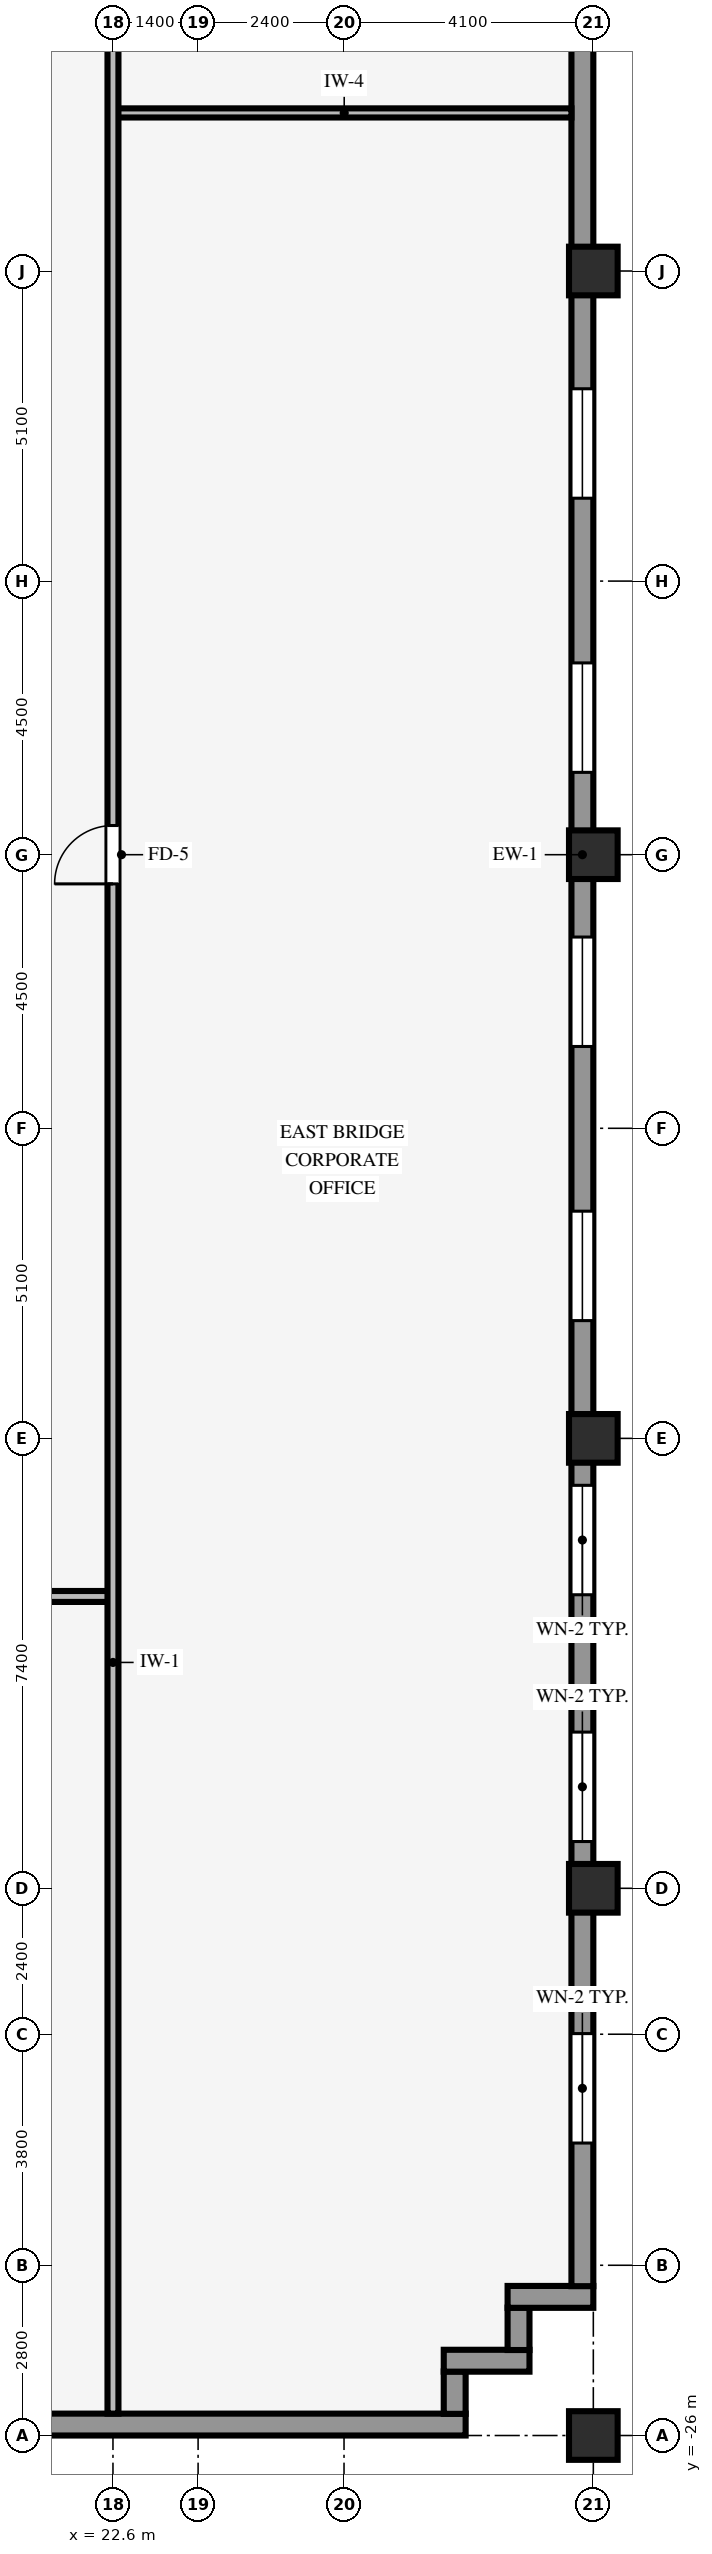
"""IFC4 building model, lengths in metres.
Left out: names, types, materials, properties, quantities, classifications, styles, units other than length and angle.
Written with IfcOpenShell. Run it as: python <this file> out.ifc"""

import sys

from ifc_helpers import new_model, si_unit, direction, frame, frame_2d, origin, origin_2d, place, context, subcontext, project, spatial, rectangle, hollow_rectangle, extrude, source, transform, mapped, element, fill, save


model = new_model("IFC4")
c1 = context("Model", 3, precision=1e-05, world=origin(), true_north=direction((0.0, 1.0)))
c2 = subcontext(c1, "Body", "Model", "MODEL_VIEW")
j1 = project(units=[si_unit("LENGTHUNIT", "METRE"), si_unit("PLANEANGLEUNIT", "RADIAN")], contexts=[c1])
p1 = place(None, origin())
s1 = spatial("IfcSite", under=j1, at=p1, CompositionType="ELEMENT")
p2 = place(p1, origin())
s2 = spatial("IfcBuilding", under=s1, at=p2, CompositionType="ELEMENT")
p3 = place(p2, frame((0.0, 0.0, 23.0)))
s3 = spatial("IfcBuildingStorey", under=s2, at=p3, CompositionType="ELEMENT", Elevation=23.0)
p4 = place(p3, frame((30.5, -26.0, -0.4), z_axis=(0.0, 0.0, 1.0), x_axis=(1.0, 0.0, 0.0)))
e1 = element("IfcColumn", 1, at=p4, inside=s3, PredefinedType="COLUMN", context=c2, shape_type="SweptSolid", body=[
    extrude(hollow_rectangle(XDim=0.8, YDim=0.8, WallThickness=0.055, InnerFilletRadius=0.055, OuterFilletRadius=0.11, at=origin_2d()), origin(), (0.0, 0.0, 1.0), 4.6),
])
for number, where, z_axis, x_axis in (
    (2, (30.5, -17.0, 0.0), (0.0, 0.0, 1.0), (1.0, 0.0, 0.0)),
    (3, (30.5, -9.6, 0.0), (0.0, 0.0, 1.0), (1.0, 0.0, 0.0)),
    (4, (30.5, 0.0, 0.0), (0.0, 0.0, 1.0), (1.0, 0.0, 0.0)),
    (5, (30.5, 9.6, 0.0), (0.0, 0.0, 1.0), (1.0, 0.0, 0.0)),
):
    element("IfcColumn", number, at=place(p3, frame(where, z_axis=z_axis, x_axis=x_axis)), inside=s3, PredefinedType="COLUMN", context=c2, shape_type="SweptSolid", body=[
        extrude(hollow_rectangle(XDim=0.8, YDim=0.8, WallThickness=0.055, InnerFilletRadius=0.055, OuterFilletRadius=0.11, at=origin_2d()), origin(), (0.0, 0.0, 1.0), 4.2),
    ])
p5 = place(p3, frame((3.6, -25.82, 0.0), z_axis=(0.0, 0.0, 1.0), x_axis=(1.0, 0.0, 0.0)))
e6 = element("IfcWall", 6, at=p5, inside=s3, PredefinedType="STANDARD", context=c2, shape_type="SweptSolid", body=[
    extrude(rectangle(XDim=24.8, YDim=0.36, at=frame_2d((12.4, 0.0))), origin(), (0.0, 0.0, 1.0), 2.785),
])
p6 = place(p3, frame((28.22, -25.644, 0.0), z_axis=(0.0, 0.0, 1.0), x_axis=(0.0, 1.0, 0.0)))
e7 = element("IfcWall", 7, at=p6, inside=s3, PredefinedType="STANDARD", context=c2, shape_type="SweptSolid", body=[
    extrude(rectangle(XDim=0.698, YDim=0.36, at=frame_2d((0.349, 0.0))), origin(), (0.0, 0.0, 1.0), 4.19),
])
p7 = place(p3, frame((28.04, -24.77, 0.0), z_axis=(0.0, 0.0, 1.0), x_axis=(1.0, 0.0, 0.0)))
e8 = element("IfcWall", 8, at=p7, inside=s3, PredefinedType="STANDARD", context=c2, shape_type="SweptSolid", body=[
    extrude(rectangle(XDim=1.41, YDim=0.36, at=frame_2d((0.705, 0.0))), origin(), (0.0, 0.0, 1.0), 4.19),
])
p8 = place(p3, frame((29.27, -24.594, 0.0), z_axis=(0.0, 0.0, 1.0), x_axis=(0.0, 1.0, 0.0)))
e9 = element("IfcWall", 9, at=p8, inside=s3, PredefinedType="STANDARD", context=c2, shape_type="SweptSolid", body=[
    extrude(rectangle(XDim=0.698, YDim=0.36, at=frame_2d((0.349, 0.0))), origin(), (0.0, 0.0, 1.0), 4.19),
])
p9 = place(p3, frame((29.09, -23.72, 0.0), z_axis=(0.0, 0.0, 1.0), x_axis=(1.0, 0.0, 0.0)))
e10 = element("IfcWall", 10, at=p9, inside=s3, PredefinedType="STANDARD", context=c2, shape_type="SweptSolid", body=[
    extrude(rectangle(XDim=1.41, YDim=0.36, at=frame_2d((0.705, 0.0))), origin(), (0.0, 0.0, 1.0), 4.19),
])
p10 = place(p3, frame((30.32, -23.544, 0.0), z_axis=(0.0, 0.0, 1.0), x_axis=(0.0, 1.0, 0.0)))
e11 = element("IfcWall", 11, at=p10, inside=s3, PredefinedType="STANDARD", context=c2, shape_type="SweptSolid", body=[
    extrude(rectangle(XDim=47.088, YDim=0.36, at=frame_2d((23.544, 0.0))), origin(), (0.0, 0.0, 1.0), 3.702),
])
p11 = place(p10, frame((2.354, 0.0, 0.85)))
e12 = element("IfcOpeningElement", 12, at=p11, cuts=e11, PredefinedType="OPENING", context=c2, shape_type="SweptSolid", body=[
    extrude(rectangle(XDim=1.8, YDim=2.35, at=frame_2d((0.9, 1.175))), frame((0.0, 0.19, 0.0), z_axis=(0.0, -1.0, 0.0), x_axis=(1.0, 0.0, 0.0)), (0.0, 0.0, 1.0), 0.38),
])
p12 = place(p10, frame((7.313, 0.0, 0.85)))
e13 = element("IfcOpeningElement", 13, at=p12, cuts=e11, PredefinedType="OPENING", context=c2, shape_type="SweptSolid", body=[
    extrude(rectangle(XDim=1.8, YDim=2.35, at=frame_2d((0.9, 1.175))), frame((0.0, 0.19, 0.0), z_axis=(0.0, -1.0, 0.0), x_axis=(1.0, 0.0, 0.0)), (0.0, 0.0, 1.0), 0.38),
])
p13 = place(p10, frame((11.372, 0.0, 0.85)))
e14 = element("IfcOpeningElement", 14, at=p13, cuts=e11, PredefinedType="OPENING", context=c2, shape_type="SweptSolid", body=[
    extrude(rectangle(XDim=1.8, YDim=2.35, at=frame_2d((0.9, 1.175))), frame((0.0, 0.19, 0.0), z_axis=(0.0, -1.0, 0.0), x_axis=(1.0, 0.0, 0.0)), (0.0, 0.0, 1.0), 0.38),
])
p14 = place(p10, frame((15.881, 0.0, 0.85)))
e15 = element("IfcOpeningElement", 15, at=p14, cuts=e11, PredefinedType="OPENING", context=c2, shape_type="SweptSolid", body=[
    extrude(rectangle(XDim=1.8, YDim=2.35, at=frame_2d((0.9, 1.175))), frame((0.0, 0.19, 0.0), z_axis=(0.0, -1.0, 0.0), x_axis=(1.0, 0.0, 0.0)), (0.0, 0.0, 1.0), 0.38),
])
p15 = place(p10, frame((20.39, 0.0, 0.85)))
e16 = element("IfcOpeningElement", 16, at=p15, cuts=e11, PredefinedType="OPENING", context=c2, shape_type="SweptSolid", body=[
    extrude(rectangle(XDim=1.8, YDim=2.35, at=frame_2d((0.9, 1.175))), frame((0.0, 0.19, 0.0), z_axis=(0.0, -1.0, 0.0), x_axis=(1.0, 0.0, 0.0)), (0.0, 0.0, 1.0), 0.38),
])
p16 = place(p10, frame((24.898, 0.0, 0.85)))
e17 = element("IfcOpeningElement", 17, at=p16, cuts=e11, PredefinedType="OPENING", context=c2, shape_type="SweptSolid", body=[
    extrude(rectangle(XDim=1.8, YDim=2.35, at=frame_2d((0.9, 1.175))), frame((0.0, 0.19, 0.0), z_axis=(0.0, -1.0, 0.0), x_axis=(1.0, 0.0, 0.0)), (0.0, 0.0, 1.0), 0.38),
])
p17 = place(p10, frame((29.407, 0.0, 0.85)))
e18 = element("IfcOpeningElement", 18, at=p17, cuts=e11, PredefinedType="OPENING", context=c2, shape_type="SweptSolid", body=[
    extrude(rectangle(XDim=1.8, YDim=2.35, at=frame_2d((0.9, 1.175))), frame((0.0, 0.19, 0.0), z_axis=(0.0, -1.0, 0.0), x_axis=(1.0, 0.0, 0.0)), (0.0, 0.0, 1.0), 0.38),
])
p18 = place(p10, frame((42.034, 0.0, 0.85)))
e19 = element("IfcOpeningElement", 19, at=p18, cuts=e11, PredefinedType="OPENING", context=c2, shape_type="SweptSolid", body=[
    extrude(rectangle(XDim=1.8, YDim=2.35, at=frame_2d((0.9, 1.175))), frame((0.0, 0.19, 0.0), z_axis=(0.0, -1.0, 0.0), x_axis=(1.0, 0.0, 0.0)), (0.0, 0.0, 1.0), 0.38),
])
p19 = place(p3, frame((-8.8, -12.2, 0.0), z_axis=(0.0, 0.0, 1.0), x_axis=(1.0, 0.0, 0.0)))
e20 = element("IfcWall", 20, at=p19, inside=s3, PredefinedType="PARTITIONING", context=c2, shape_type="SweptSolid", body=[
    extrude(rectangle(XDim=31.334, YDim=0.18, at=frame_2d((15.667, 0.0))), origin(), (0.0, 0.0, 1.0), 4.19),
])
p20 = place(p19, frame((8.32, 0.0, 0.0)))
e21 = element("IfcOpeningElement", 21, at=p20, cuts=e20, PredefinedType="OPENING", context=c2, shape_type="SweptSolid", body=[
    extrude(rectangle(XDim=0.96, YDim=2.1, at=frame_2d((0.48, 1.05))), frame((0.0, 0.1, 0.0), z_axis=(0.0, -1.0, 0.0), x_axis=(1.0, 0.0, 0.0)), (0.0, 0.0, 1.0), 0.2),
])
p21 = place(p19, frame((22.62, 0.0, 0.0)))
e22 = element("IfcOpeningElement", 22, at=p21, cuts=e20, PredefinedType="OPENING", context=c2, shape_type="SweptSolid", body=[
    extrude(rectangle(XDim=0.96, YDim=2.1, at=frame_2d((0.48, 1.05))), frame((0.0, 0.1, 0.0), z_axis=(0.0, -1.0, 0.0), x_axis=(1.0, 0.0, 0.0)), (0.0, 0.0, 1.0), 0.2),
])
p22 = place(p3, frame((22.666, 12.2, 0.0), z_axis=(0.0, 0.0, 1.0), x_axis=(1.0, 0.0, 0.0)))
e23 = element("IfcWall", 23, at=p22, inside=s3, PredefinedType="PARTITIONING", context=c2, shape_type="SweptSolid", body=[
    extrude(rectangle(XDim=7.474, YDim=0.15, at=frame_2d((3.737, 0.0))), origin(), (0.0, 0.0, 1.0), 4.19),
])
p23 = place(p3, frame((22.6, -25.64, 0.0), z_axis=(0.0, 0.0, 1.0), x_axis=(0.0, 1.0, 0.0)))
e24 = element("IfcWall", 24, at=p23, inside=s3, PredefinedType="PARTITIONING", context=c2, shape_type="SweptSolid", body=[
    extrude(rectangle(XDim=51.28, YDim=0.18, at=frame_2d((25.64, 0.0))), origin(), (0.0, 0.0, 1.0), 4.19),
])
p24 = place(p23, frame((25.16, 0.0, 0.0)))
e25 = element("IfcOpeningElement", 25, at=p24, cuts=e24, PredefinedType="OPENING", context=c2, shape_type="SweptSolid", body=[
    extrude(rectangle(XDim=0.96, YDim=2.1, at=frame_2d((0.48, 1.05))), frame((0.0, 0.1, 0.0), z_axis=(0.0, -1.0, 0.0), x_axis=(1.0, 0.0, 0.0)), (0.0, 0.0, 1.0), 0.2),
])
p25 = place(p23, frame((43.09, 0.0, 0.0)))
e26 = element("IfcOpeningElement", 26, at=p25, cuts=e24, PredefinedType="OPENING", context=c2, shape_type="SweptSolid", body=[
    extrude(rectangle(XDim=0.9, YDim=2.1, at=frame_2d((0.45, 1.05))), frame((0.0, 0.1, 0.0), z_axis=(0.0, -1.0, 0.0), x_axis=(1.0, 0.0, 0.0)), (0.0, 0.0, 1.0), 0.2),
])
p26 = place(p23, frame((38.89, 0.0, 0.0)))
e27 = element("IfcOpeningElement", 27, at=p26, cuts=e24, PredefinedType="OPENING", context=c2, shape_type="SweptSolid", body=[
    extrude(rectangle(XDim=0.9, YDim=2.1, at=frame_2d((0.45, 1.05))), frame((0.0, 0.1, 0.0), z_axis=(0.0, -1.0, 0.0), x_axis=(1.0, 0.0, 0.0)), (0.0, 0.0, 1.0), 0.2),
])
p27 = place(p23, frame((47.29, 0.0, 0.0)))
e28 = element("IfcOpeningElement", 28, at=p27, cuts=e24, PredefinedType="OPENING", context=c2, shape_type="SweptSolid", body=[
    extrude(rectangle(XDim=0.9, YDim=2.1, at=frame_2d((0.45, 1.05))), frame((0.0, 0.1, 0.0), z_axis=(0.0, -1.0, 0.0), x_axis=(1.0, 0.0, 0.0)), (0.0, 0.0, 1.0), 0.2),
])
m1 = source(origin(), c2, "Body", "SweptSolid", [
    extrude(rectangle(XDim=1.8, YDim=2.35, at=frame_2d((0.9, 1.175))), frame((0.0, 0.03, 0.0), z_axis=(0.0, -1.0, 0.0), x_axis=(1.0, 0.0, 0.0)), (0.0, 0.0, 1.0), 0.06),
])
p28 = place(p11, origin())
e29 = element("IfcWindow", 29, at=p28, inside=s3, PartitioningType="SINGLE_PANEL", PredefinedType="WINDOW", context=c2, shape_type="MappedRepresentation", body=[
    mapped(m1, transform((0.0, 0.0, 0.0), scale=1.0)),
])
fill(e12, e29)
p29 = place(p12, origin())
e30 = element("IfcWindow", 30, at=p29, inside=s3, PartitioningType="SINGLE_PANEL", PredefinedType="WINDOW", context=c2, shape_type="MappedRepresentation", body=[
    mapped(m1, transform((0.0, 0.0, 0.0), scale=1.0)),
])
fill(e13, e30)
p30 = place(p13, origin())
e31 = element("IfcWindow", 31, at=p30, inside=s3, PartitioningType="SINGLE_PANEL", PredefinedType="WINDOW", context=c2, shape_type="MappedRepresentation", body=[
    mapped(m1, transform((0.0, 0.0, 0.0), scale=1.0)),
])
fill(e14, e31)
p31 = place(p14, origin())
e32 = element("IfcWindow", 32, at=p31, inside=s3, PartitioningType="SINGLE_PANEL", PredefinedType="WINDOW", context=c2, shape_type="MappedRepresentation", body=[
    mapped(m1, transform((0.0, 0.0, 0.0), scale=1.0)),
])
fill(e15, e32)
p32 = place(p15, origin())
e33 = element("IfcWindow", 33, at=p32, inside=s3, PartitioningType="SINGLE_PANEL", PredefinedType="WINDOW", context=c2, shape_type="MappedRepresentation", body=[
    mapped(m1, transform((0.0, 0.0, 0.0), scale=1.0)),
])
fill(e16, e33)
p33 = place(p16, origin())
e34 = element("IfcWindow", 34, at=p33, inside=s3, PartitioningType="SINGLE_PANEL", PredefinedType="WINDOW", context=c2, shape_type="MappedRepresentation", body=[
    mapped(m1, transform((0.0, 0.0, 0.0), scale=1.0)),
])
fill(e17, e34)
p34 = place(p17, origin())
e35 = element("IfcWindow", 35, at=p34, inside=s3, PartitioningType="SINGLE_PANEL", PredefinedType="WINDOW", context=c2, shape_type="MappedRepresentation", body=[
    mapped(m1, transform((0.0, 0.0, 0.0), scale=1.0)),
])
fill(e18, e35)
m2 = source(origin(), c2, "Body", "SweptSolid", [
    extrude(rectangle(XDim=0.96, YDim=2.1, at=frame_2d((0.48, 1.05))), frame((0.0, 0.025, 0.0), z_axis=(0.0, -1.0, 0.0), x_axis=(1.0, 0.0, 0.0)), (0.0, 0.0, 1.0), 0.05),
])
p35 = place(p24, origin())
e36 = element("IfcDoor", 36, at=p35, inside=s3, OperationType="SINGLE_SWING_LEFT", PredefinedType="DOOR", context=c2, shape_type="MappedRepresentation", body=[
    mapped(m2, transform((0.0, 0.0, 0.0), scale=1.0)),
])
fill(e25, e36)
save(model, sys.argv[1])
